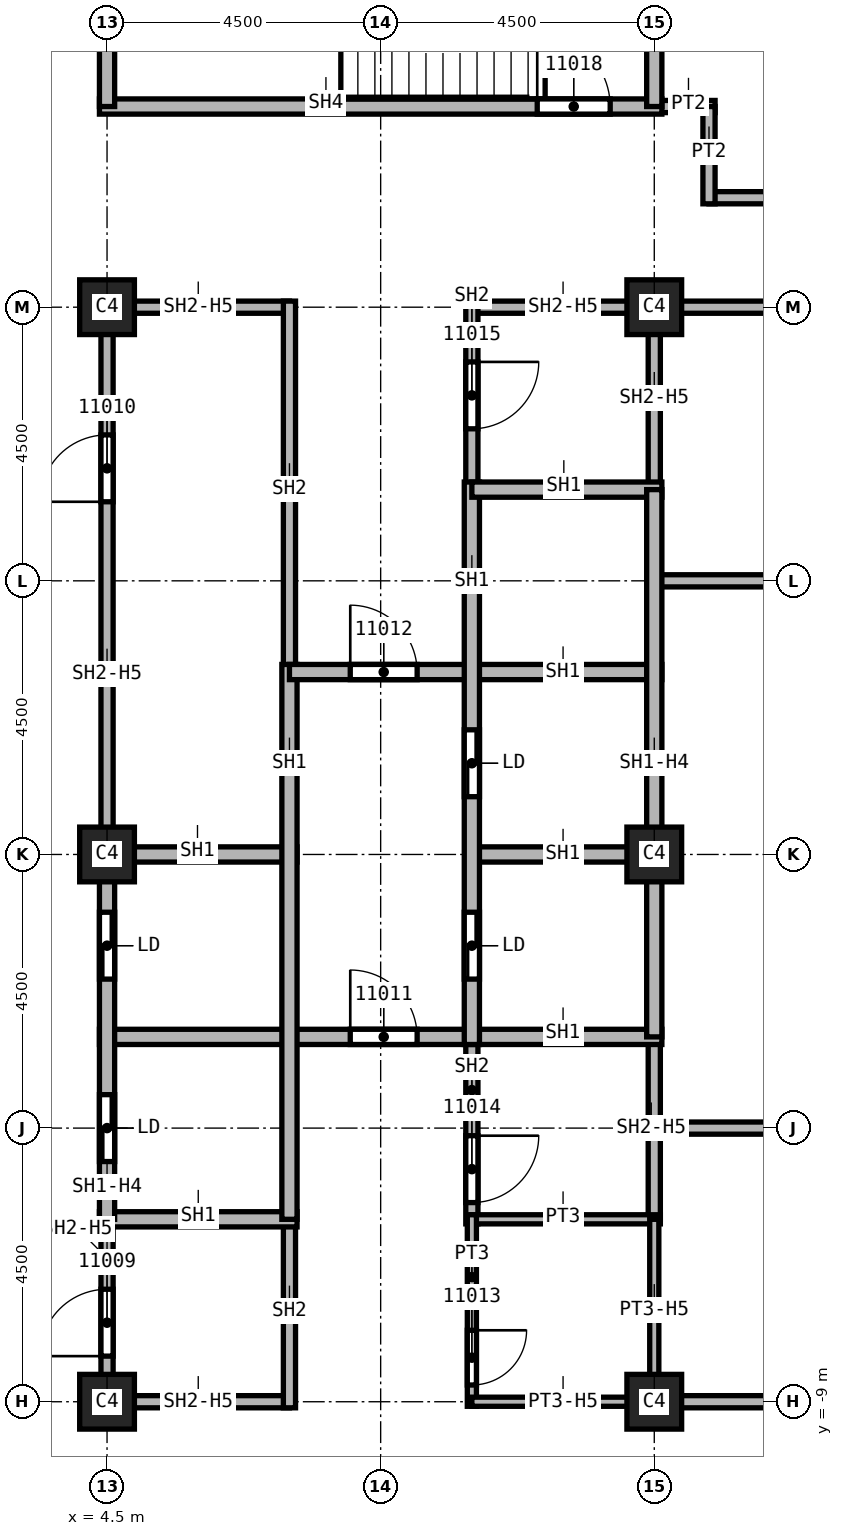
"""IFC4 building model, lengths in metres.
Left out: names, types, materials, properties, quantities, classifications, styles, units other than length and angle.
Written with IfcOpenShell. Run it as: python <this file> out.ifc"""

import sys

from ifc_helpers import new_model, si_unit, direction, frame, frame_2d, origin, origin_2d, place, context, subcontext, project, spatial, rectangle, extrude, element, fill, save


model = new_model("IFC4")
c1 = context("Model", 3, precision=1e-05, world=origin(), true_north=direction((0.0, 1.0)))
c2 = subcontext(c1, "Body", "Model", "MODEL_VIEW")
j1 = project(units=[si_unit("LENGTHUNIT", "METRE"), si_unit("PLANEANGLEUNIT", "RADIAN")], contexts=[c1])
p1 = place(None, origin())
s1 = spatial("IfcSite", under=j1, at=p1, CompositionType="ELEMENT")
p2 = place(p1, origin())
s2 = spatial("IfcBuilding", under=s1, at=p2, CompositionType="ELEMENT")
p3 = place(p2, frame((0.0, 0.0, 188.0)))
s3 = spatial("IfcBuildingStorey", under=s2, at=p3, CompositionType="ELEMENT", Elevation=188.0)
for number, where, z_axis, x_axis in (
    (1, (4.5, 0.0, 0.0), (0.0, 0.0, 1.0), (1.0, 0.0, 0.0)),
    (2, (4.5, 9.0, 0.0), (0.0, 0.0, 1.0), (1.0, 0.0, 0.0)),
    (3, (4.5, -9.0, 0.0), (0.0, 0.0, 1.0), (1.0, 0.0, 0.0)),
    (4, (13.5, 0.0, 0.0), (0.0, 0.0, 1.0), (1.0, 0.0, 0.0)),
    (5, (13.5, 9.0, 0.0), (0.0, 0.0, 1.0), (1.0, 0.0, 0.0)),
    (6, (13.5, -9.0, 0.0), (0.0, 0.0, 1.0), (1.0, 0.0, 0.0)),
):
    element("IfcColumn", number, at=place(p3, frame(where, z_axis=z_axis, x_axis=x_axis)), inside=s3, PredefinedType="COLUMN", context=c2, shape_type="SweptSolid", body=[
        extrude(rectangle(XDim=0.9, YDim=0.9, at=origin_2d()), origin(), (0.0, 0.0, 1.0), 3.72),
    ])
p4 = place(p3, frame((13.375, 12.3, 0.0), z_axis=(0.0, 0.0, 1.0), x_axis=(1.0, 0.0, 0.0)))
e7 = element("IfcWall", 7, at=p4, inside=s3, PredefinedType="PARTITIONING", context=c2, shape_type="SweptSolid", body=[
    extrude(rectangle(XDim=1.125, YDim=0.2, at=frame_2d((0.562, 0.0))), origin(), (0.0, 0.0, 1.0), 3.72),
])
for number, where, z_axis, x_axis in (
    (8, (13.5, -9.0, 0.0), (0.0, 0.0, 1.0), (1.0, 0.0, 0.0)),
    (9, (13.5, -4.5, 0.0), (0.0, 0.0, 1.0), (1.0, 0.0, 0.0)),
    (10, (13.5, 4.5, 0.0), (0.0, 0.0, 1.0), (1.0, 0.0, 0.0)),
    (11, (18.0, 9.0, 0.0), (0.0, 0.0, 1.0), (-1.0, 0.0, 0.0)),
):
    element("IfcWall", number, at=place(p3, frame(where, z_axis=z_axis, x_axis=x_axis)), inside=s3, PredefinedType="PARTITIONING", context=c2, shape_type="SweptSolid", body=[
        extrude(rectangle(XDim=4.5, YDim=0.2, at=frame_2d((2.25, 0.0))), origin(), (0.0, 0.0, 1.0), 3.72),
    ])
p5 = place(p3, frame((14.4, 10.8, 0.0), z_axis=(0.0, 0.0, 1.0), x_axis=(1.0, 0.0, 0.0)))
e12 = element("IfcWall", 12, at=p5, inside=s3, PredefinedType="PARTITIONING", context=c2, shape_type="SweptSolid", body=[
    extrude(rectangle(XDim=3.6, YDim=0.2, at=frame_2d((1.8, 0.0))), origin(), (0.0, 0.0, 1.0), 3.72),
])
p6 = place(p3, frame((14.4, 12.3, 0.0), z_axis=(0.0, 0.0, 1.0), x_axis=(0.0, -1.0, 0.0)))
e13 = element("IfcWall", 13, at=p6, inside=s3, PredefinedType="PARTITIONING", context=c2, shape_type="SweptSolid", body=[
    extrude(rectangle(XDim=1.6, YDim=0.2, at=frame_2d((0.8, 0.0))), origin(), (0.0, 0.0, 1.0), 3.72),
])
p7 = place(p3, frame((4.5, -9.1, 0.0), z_axis=(0.0, 0.0, 1.0), x_axis=(0.0, 1.0, 0.0)))
e14 = element("IfcWall", 14, at=p7, inside=s3, PredefinedType="SOLIDWALL", context=c2, shape_type="SweptSolid", body=[
    extrude(rectangle(XDim=3.1, YDim=0.2, at=frame_2d((1.55, 0.0))), origin(), (0.0, 0.0, 1.0), 2.958),
])
p8 = place(p7, frame((0.85, 0.0, 0.0)))
e15 = element("IfcOpeningElement", 15, at=p8, cuts=e14, PredefinedType="OPENING", context=c2, shape_type="SweptSolid", body=[
    extrude(rectangle(XDim=1.1, YDim=2.1, at=frame_2d((0.55, 1.05))), frame((0.0, 0.1, 0.0), z_axis=(0.0, -1.0, 0.0), x_axis=(1.0, 0.0, 0.0)), (0.0, 0.0, 1.0), 0.2),
])
p9 = place(p3, frame((4.5, 0.0, 0.0), z_axis=(0.0, 0.0, 1.0), x_axis=(0.0, 1.0, 0.0)))
e16 = element("IfcWall", 16, at=p9, inside=s3, PredefinedType="SOLIDWALL", context=c2, shape_type="SweptSolid", body=[
    extrude(rectangle(XDim=9.1, YDim=0.2, at=frame_2d((4.55, 0.0))), origin(), (0.0, 0.0, 1.0), 2.958),
])
p10 = place(p9, frame((5.8, 0.0, 0.0)))
e17 = element("IfcOpeningElement", 17, at=p10, cuts=e16, PredefinedType="OPENING", context=c2, shape_type="SweptSolid", body=[
    extrude(rectangle(XDim=1.1, YDim=2.1, at=frame_2d((0.55, 1.05))), frame((0.0, 0.1, 0.0), z_axis=(0.0, -1.0, 0.0), x_axis=(1.0, 0.0, 0.0)), (0.0, 0.0, 1.0), 0.2),
])
for number, where, z_axis, x_axis in (
    (18, (4.5, 9.0, 0.0), (0.0, 0.0, 1.0), (1.0, 0.0, 0.0)),
    (19, (7.5, -9.0, 0.0), (0.0, 0.0, 1.0), (-1.0, 0.0, 0.0)),
):
    element("IfcWall", number, at=place(p3, frame(where, z_axis=z_axis, x_axis=x_axis)), inside=s3, PredefinedType="SOLIDWALL", context=c2, shape_type="SweptSolid", body=[
        extrude(rectangle(XDim=3.0, YDim=0.2, at=frame_2d((1.5, 0.0))), origin(), (0.0, 0.0, 1.0), 2.958),
    ])
p11 = place(p3, frame((7.5, -6.0, 0.0), z_axis=(0.0, 0.0, 1.0), x_axis=(0.0, -1.0, 0.0)))
e20 = element("IfcWall", 20, at=p11, inside=s3, PredefinedType="SOLIDWALL", context=c2, shape_type="SweptSolid", body=[
    extrude(rectangle(XDim=3.1, YDim=0.2, at=frame_2d((1.55, 0.0))), origin(), (0.0, 0.0, 1.0), 3.72),
])
p12 = place(p3, frame((7.5, 9.1, 0.0), z_axis=(0.0, 0.0, 1.0), x_axis=(0.0, -1.0, 0.0)))
e21 = element("IfcWall", 21, at=p12, inside=s3, PredefinedType="SOLIDWALL", context=c2, shape_type="SweptSolid", body=[
    extrude(rectangle(XDim=6.225, YDim=0.2, at=frame_2d((3.113, 0.0))), origin(), (0.0, 0.0, 1.0), 3.72),
])
p13 = place(p3, frame((10.5, -2.875, 0.0), z_axis=(0.0, 0.0, 1.0), x_axis=(0.0, -1.0, 0.0)))
e22 = element("IfcWall", 22, at=p13, inside=s3, PredefinedType="SOLIDWALL", context=c2, shape_type="SweptSolid", body=[
    extrude(rectangle(XDim=3.2, YDim=0.2, at=frame_2d((1.6, 0.0))), origin(), (0.0, 0.0, 1.0), 3.72),
])
p14 = place(p13, frame((1.75, 0.0, 0.0)))
e23 = element("IfcOpeningElement", 23, at=p14, cuts=e22, PredefinedType="OPENING", context=c2, shape_type="SweptSolid", body=[
    extrude(rectangle(XDim=1.1, YDim=2.1, at=frame_2d((0.55, 1.05))), frame((0.0, 0.1, 0.0), z_axis=(0.0, -1.0, 0.0), x_axis=(1.0, 0.0, 0.0)), (0.0, 0.0, 1.0), 0.2),
])
p15 = place(p3, frame((10.5, 9.0, 0.0), z_axis=(0.0, 0.0, 1.0), x_axis=(1.0, 0.0, 0.0)))
e24 = element("IfcWall", 24, at=p15, inside=s3, PredefinedType="SOLIDWALL", context=c2, shape_type="SweptSolid", body=[
    extrude(rectangle(XDim=3.1, YDim=0.2, at=frame_2d((1.55, 0.0))), origin(), (0.0, 0.0, 1.0), 2.958),
])
p16 = place(p3, frame((10.5, 9.1, 0.0), z_axis=(0.0, 0.0, 1.0), x_axis=(0.0, -1.0, 0.0)))
e25 = element("IfcWall", 25, at=p16, inside=s3, PredefinedType="SOLIDWALL", context=c2, shape_type="SweptSolid", body=[
    extrude(rectangle(XDim=3.225, YDim=0.2, at=frame_2d((1.613, 0.0))), origin(), (0.0, 0.0, 1.0), 3.72),
])
p17 = place(p16, frame((1.0, 0.0, 0.0)))
e26 = element("IfcOpeningElement", 26, at=p17, cuts=e25, PredefinedType="OPENING", context=c2, shape_type="SweptSolid", body=[
    extrude(rectangle(XDim=1.1, YDim=2.1, at=frame_2d((0.55, 1.05))), frame((0.0, 0.1, 0.0), z_axis=(0.0, -1.0, 0.0), x_axis=(1.0, 0.0, 0.0)), (0.0, 0.0, 1.0), 0.2),
])
p18 = place(p3, frame((13.5, -3.0, 0.0), z_axis=(0.0, 0.0, 1.0), x_axis=(0.0, -1.0, 0.0)))
e27 = element("IfcWall", 27, at=p18, inside=s3, PredefinedType="SOLIDWALL", context=c2, shape_type="SweptSolid", body=[
    extrude(rectangle(XDim=3.0, YDim=0.2, at=frame_2d((1.5, 0.0))), origin(), (0.0, 0.0, 1.0), 2.958),
])
p19 = place(p3, frame((13.5, 9.1, 0.0), z_axis=(0.0, 0.0, 1.0), x_axis=(0.0, -1.0, 0.0)))
e28 = element("IfcWall", 28, at=p19, inside=s3, PredefinedType="SOLIDWALL", context=c2, shape_type="SweptSolid", body=[
    extrude(rectangle(XDim=3.1, YDim=0.2, at=frame_2d((1.55, 0.0))), origin(), (0.0, 0.0, 1.0), 2.958),
])
p20 = place(p3, frame((4.375, -6.0, 0.0), z_axis=(0.0, 0.0, 1.0), x_axis=(1.0, 0.0, 0.0)))
e29 = element("IfcWall", 29, at=p20, inside=s3, PredefinedType="SOLIDWALL", context=c2, shape_type="SweptSolid", body=[
    extrude(rectangle(XDim=3.25, YDim=0.25, at=frame_2d((1.625, 0.0))), origin(), (0.0, 0.0, 1.0), 3.72),
])
p21 = place(p3, frame((4.375, -3.0, 0.0), z_axis=(0.0, 0.0, 1.0), x_axis=(1.0, 0.0, 0.0)))
e30 = element("IfcWall", 30, at=p21, inside=s3, PredefinedType="SOLIDWALL", context=c2, shape_type="SweptSolid", body=[
    extrude(rectangle(XDim=9.25, YDim=0.25, at=frame_2d((4.625, 0.0))), origin(), (0.0, 0.0, 1.0), 3.72),
])
p22 = place(p21, frame((4.125, 0.0, 0.0)))
e31 = element("IfcOpeningElement", 31, at=p22, cuts=e30, PredefinedType="OPENING", context=c2, shape_type="SweptSolid", body=[
    extrude(rectangle(XDim=1.1, YDim=2.1, at=frame_2d((0.55, 1.05))), frame((0.0, 0.125, 0.0), z_axis=(0.0, -1.0, 0.0), x_axis=(1.0, 0.0, 0.0)), (0.0, 0.0, 1.0), 0.25),
])
p23 = place(p3, frame((4.375, 0.0, 0.0), z_axis=(0.0, 0.0, 1.0), x_axis=(1.0, 0.0, 0.0)))
e32 = element("IfcWall", 32, at=p23, inside=s3, PredefinedType="SOLIDWALL", context=c2, shape_type="SweptSolid", body=[
    extrude(rectangle(XDim=3.25, YDim=0.25, at=frame_2d((1.625, 0.0))), origin(), (0.0, 0.0, 1.0), 3.72),
])
p24 = place(p3, frame((4.5, -6.0, 0.0), z_axis=(0.0, 0.0, 1.0), x_axis=(0.0, 1.0, 0.0)))
e33 = element("IfcWall", 33, at=p24, inside=s3, PredefinedType="SOLIDWALL", context=c2, shape_type="SweptSolid", body=[
    extrude(rectangle(XDim=6.0, YDim=0.25, at=frame_2d((3.0, 0.0))), origin(), (0.0, 0.0, 1.0), 2.958),
])
p25 = place(p24, frame((0.95, 0.0, 0.0)))
e34 = element("IfcOpeningElement", 34, at=p25, cuts=e33, PredefinedType="OPENING", context=c2, shape_type="SweptSolid", body=[
    extrude(rectangle(XDim=1.1, YDim=2.1, at=frame_2d((0.55, 1.05))), frame((0.0, 0.125, 0.0), z_axis=(0.0, -1.0, 0.0), x_axis=(1.0, 0.0, 0.0)), (0.0, 0.0, 1.0), 0.25),
])
p26 = place(p24, frame((3.95, 0.0, 0.0)))
e35 = element("IfcOpeningElement", 35, at=p26, cuts=e33, PredefinedType="OPENING", context=c2, shape_type="SweptSolid", body=[
    extrude(rectangle(XDim=1.1, YDim=2.1, at=frame_2d((0.55, 1.05))), frame((0.0, 0.125, 0.0), z_axis=(0.0, -1.0, 0.0), x_axis=(1.0, 0.0, 0.0)), (0.0, 0.0, 1.0), 0.25),
])
p27 = place(p3, frame((7.5, 3.125, 0.0), z_axis=(0.0, 0.0, 1.0), x_axis=(0.0, -1.0, 0.0)))
e36 = element("IfcWall", 36, at=p27, inside=s3, PredefinedType="SOLIDWALL", context=c2, shape_type="SweptSolid", body=[
    extrude(rectangle(XDim=9.125, YDim=0.25, at=frame_2d((4.562, 0.0))), origin(), (0.0, 0.0, 1.0), 3.72),
])
p28 = place(p3, frame((7.5, 3.0, 0.0), z_axis=(0.0, 0.0, 1.0), x_axis=(1.0, 0.0, 0.0)))
e37 = element("IfcWall", 37, at=p28, inside=s3, PredefinedType="SOLIDWALL", context=c2, shape_type="SweptSolid", body=[
    extrude(rectangle(XDim=6.125, YDim=0.25, at=frame_2d((3.062, 0.0))), origin(), (0.0, 0.0, 1.0), 3.72),
])
p29 = place(p28, frame((1.0, 0.0, 0.0)))
e38 = element("IfcOpeningElement", 38, at=p29, cuts=e37, PredefinedType="OPENING", context=c2, shape_type="SweptSolid", body=[
    extrude(rectangle(XDim=1.1, YDim=2.1, at=frame_2d((0.55, 1.05))), frame((0.0, 0.125, 0.0), z_axis=(0.0, -1.0, 0.0), x_axis=(1.0, 0.0, 0.0)), (0.0, 0.0, 1.0), 0.25),
])
p30 = place(p3, frame((10.5, 0.0, 0.0), z_axis=(0.0, 0.0, 1.0), x_axis=(1.0, 0.0, 0.0)))
e39 = element("IfcWall", 39, at=p30, inside=s3, PredefinedType="SOLIDWALL", context=c2, shape_type="SweptSolid", body=[
    extrude(rectangle(XDim=3.125, YDim=0.25, at=frame_2d((1.562, 0.0))), origin(), (0.0, 0.0, 1.0), 3.72),
])
p31 = place(p3, frame((10.5, 6.125, 0.0), z_axis=(0.0, 0.0, 1.0), x_axis=(0.0, -1.0, 0.0)))
e40 = element("IfcWall", 40, at=p31, inside=s3, PredefinedType="SOLIDWALL", context=c2, shape_type="SweptSolid", body=[
    extrude(rectangle(XDim=9.25, YDim=0.25, at=frame_2d((4.625, 0.0))), origin(), (0.0, 0.0, 1.0), 3.72),
])
p32 = place(p31, frame((7.075, 0.0, 0.0)))
e41 = element("IfcOpeningElement", 41, at=p32, cuts=e40, PredefinedType="OPENING", context=c2, shape_type="SweptSolid", body=[
    extrude(rectangle(XDim=1.1, YDim=2.1, at=frame_2d((0.55, 1.05))), frame((0.0, 0.125, 0.0), z_axis=(0.0, -1.0, 0.0), x_axis=(1.0, 0.0, 0.0)), (0.0, 0.0, 1.0), 0.25),
])
p33 = place(p31, frame((4.075, 0.0, 0.0)))
e42 = element("IfcOpeningElement", 42, at=p33, cuts=e40, PredefinedType="OPENING", context=c2, shape_type="SweptSolid", body=[
    extrude(rectangle(XDim=1.1, YDim=2.1, at=frame_2d((0.55, 1.05))), frame((0.0, 0.125, 0.0), z_axis=(0.0, -1.0, 0.0), x_axis=(1.0, 0.0, 0.0)), (0.0, 0.0, 1.0), 0.25),
])
p34 = place(p3, frame((10.5, 6.0, 0.0), z_axis=(0.0, 0.0, 1.0), x_axis=(1.0, 0.0, 0.0)))
e43 = element("IfcWall", 43, at=p34, inside=s3, PredefinedType="SOLIDWALL", context=c2, shape_type="SweptSolid", body=[
    extrude(rectangle(XDim=3.125, YDim=0.25, at=frame_2d((1.562, 0.0))), origin(), (0.0, 0.0, 1.0), 3.72),
])
p35 = place(p3, frame((13.5, 6.0, 0.0), z_axis=(0.0, 0.0, 1.0), x_axis=(0.0, -1.0, 0.0)))
e44 = element("IfcWall", 44, at=p35, inside=s3, PredefinedType="SOLIDWALL", context=c2, shape_type="SweptSolid", body=[
    extrude(rectangle(XDim=9.0, YDim=0.25, at=frame_2d((4.5, 0.0))), origin(), (0.0, 0.0, 1.0), 2.958),
])
p36 = place(p3, frame((4.375, 12.3, 0.0), z_axis=(0.0, 0.0, 1.0), x_axis=(1.0, 0.0, 0.0)))
e45 = element("IfcWall", 45, at=p36, inside=s3, PredefinedType="SOLIDWALL", context=c2, shape_type="SweptSolid", body=[
    extrude(rectangle(XDim=9.25, YDim=0.25, at=frame_2d((4.625, 0.0))), origin(), (0.0, 0.0, 1.0), 3.72),
])
p37 = place(p36, frame((7.2, 0.0, 0.0)))
e46 = element("IfcOpeningElement", 46, at=p37, cuts=e45, PredefinedType="OPENING", context=c2, shape_type="SweptSolid", body=[
    extrude(rectangle(XDim=1.2, YDim=2.1, at=frame_2d((0.6, 1.05))), frame((0.0, 0.125, 0.0), z_axis=(0.0, -1.0, 0.0), x_axis=(1.0, 0.0, 0.0)), (0.0, 0.0, 1.0), 0.25),
])
for number, where, z_axis, x_axis in (
    (47, (4.5, 12.3, 0.0), (0.0, 0.0, 1.0), (0.0, 1.0, 0.0)),
    (48, (13.5, 16.8, 0.0), (0.0, 0.0, 1.0), (0.0, -1.0, 0.0)),
):
    element("IfcWall", number, at=place(p3, frame(where, z_axis=z_axis, x_axis=x_axis)), inside=s3, PredefinedType="SOLIDWALL", context=c2, shape_type="SweptSolid", body=[
        extrude(rectangle(XDim=4.5, YDim=0.25, at=frame_2d((2.25, 0.0))), origin(), (0.0, 0.0, 1.0), 3.72),
    ])
p38 = place(p3, frame((10.5, -6.0, 0.0), z_axis=(0.0, 0.0, 1.0), x_axis=(1.0, 0.0, 0.0)))
e49 = element("IfcWall", 49, at=p38, inside=s3, PredefinedType="PARTITIONING", context=c2, shape_type="SweptSolid", body=[
    extrude(rectangle(XDim=3.1, YDim=0.15, at=frame_2d((1.55, 0.0))), origin(), (0.0, 0.0, 1.0), 3.72),
])
p39 = place(p3, frame((10.5, -5.925, 0.0), z_axis=(0.0, 0.0, 1.0), x_axis=(0.0, -1.0, 0.0)))
e50 = element("IfcWall", 50, at=p39, inside=s3, PredefinedType="PARTITIONING", context=c2, shape_type="SweptSolid", body=[
    extrude(rectangle(XDim=3.15, YDim=0.15, at=frame_2d((1.575, 0.0))), origin(), (0.0, 0.0, 1.0), 3.72),
])
p40 = place(p39, frame((1.9, 0.0, 0.0)))
e51 = element("IfcOpeningElement", 51, at=p40, cuts=e50, PredefinedType="OPENING", context=c2, shape_type="SweptSolid", body=[
    extrude(rectangle(XDim=0.9, YDim=2.1, at=frame_2d((0.45, 1.05))), frame((0.0, 0.075, 0.0), z_axis=(0.0, -1.0, 0.0), x_axis=(1.0, 0.0, 0.0)), (0.0, 0.0, 1.0), 0.15),
])
p41 = place(p3, frame((13.5, -6.0, 0.0), z_axis=(0.0, 0.0, 1.0), x_axis=(0.0, -1.0, 0.0)))
e52 = element("IfcWall", 52, at=p41, inside=s3, PredefinedType="PARTITIONING", context=c2, shape_type="SweptSolid", body=[
    extrude(rectangle(XDim=3.1, YDim=0.15, at=frame_2d((1.55, 0.0))), origin(), (0.0, 0.0, 1.0), 2.958),
])
p42 = place(p3, frame((13.575, -9.0, 0.0), z_axis=(0.0, 0.0, 1.0), x_axis=(-1.0, 0.0, 0.0)))
e53 = element("IfcWall", 53, at=p42, inside=s3, PredefinedType="PARTITIONING", context=c2, shape_type="SweptSolid", body=[
    extrude(rectangle(XDim=3.075, YDim=0.15, at=frame_2d((1.538, 0.0))), origin(), (0.0, 0.0, 1.0), 2.958),
])
p43 = place(p8, origin())
e54 = element("IfcDoor", 54, at=p43, inside=s3, OperationType="SINGLE_SWING_RIGHT", PredefinedType="DOOR", context=c2, shape_type="SweptSolid", body=[
    extrude(rectangle(XDim=1.1, YDim=2.1, at=frame_2d((0.55, 1.05))), frame((0.0, 0.025, 0.0), z_axis=(0.0, -1.0, 0.0), x_axis=(1.0, 0.0, 0.0)), (0.0, 0.0, 1.0), 0.05),
])
fill(e15, e54)
p44 = place(p10, origin())
e55 = element("IfcDoor", 55, at=p44, inside=s3, OperationType="SINGLE_SWING_LEFT", PredefinedType="DOOR", context=c2, shape_type="SweptSolid", body=[
    extrude(rectangle(XDim=1.1, YDim=2.1, at=frame_2d((0.55, 1.05))), frame((0.0, 0.025, 0.0), z_axis=(0.0, -1.0, 0.0), x_axis=(1.0, 0.0, 0.0)), (0.0, 0.0, 1.0), 0.05),
])
fill(e17, e55)
p45 = place(p22, origin())
e56 = element("IfcDoor", 56, at=p45, inside=s3, OperationType="SINGLE_SWING_RIGHT", PredefinedType="DOOR", context=c2, shape_type="SweptSolid", body=[
    extrude(rectangle(XDim=1.1, YDim=2.1, at=frame_2d((0.55, 1.05))), frame((0.0, 0.025, 0.0), z_axis=(0.0, -1.0, 0.0), x_axis=(1.0, 0.0, 0.0)), (0.0, 0.0, 1.0), 0.05),
])
fill(e31, e56)
p46 = place(p29, origin())
e57 = element("IfcDoor", 57, at=p46, inside=s3, OperationType="SINGLE_SWING_LEFT", PredefinedType="DOOR", context=c2, shape_type="SweptSolid", body=[
    extrude(rectangle(XDim=1.1, YDim=2.1, at=frame_2d((0.55, 1.05))), frame((0.0, 0.025, 0.0), z_axis=(0.0, -1.0, 0.0), x_axis=(1.0, 0.0, 0.0)), (0.0, 0.0, 1.0), 0.05),
])
fill(e38, e57)
p47 = place(p40, origin())
e58 = element("IfcDoor", 58, at=p47, inside=s3, OperationType="SINGLE_SWING_RIGHT", PredefinedType="DOOR", context=c2, shape_type="SweptSolid", body=[
    extrude(rectangle(XDim=0.9, YDim=2.1, at=frame_2d((0.45, 1.05))), frame((0.0, 0.025, 0.0), z_axis=(0.0, -1.0, 0.0), x_axis=(1.0, 0.0, 0.0)), (0.0, 0.0, 1.0), 0.05),
])
fill(e51, e58)
p48 = place(p14, origin())
e59 = element("IfcDoor", 59, at=p48, inside=s3, OperationType="SINGLE_SWING_LEFT", PredefinedType="DOOR", context=c2, shape_type="SweptSolid", body=[
    extrude(rectangle(XDim=1.1, YDim=2.1, at=frame_2d((0.55, 1.05))), frame((0.0, 0.025, 0.0), z_axis=(0.0, -1.0, 0.0), x_axis=(1.0, 0.0, 0.0)), (0.0, 0.0, 1.0), 0.05),
])
fill(e23, e59)
p49 = place(p17, origin())
e60 = element("IfcDoor", 60, at=p49, inside=s3, OperationType="SINGLE_SWING_RIGHT", PredefinedType="DOOR", context=c2, shape_type="SweptSolid", body=[
    extrude(rectangle(XDim=1.1, YDim=2.1, at=frame_2d((0.55, 1.05))), frame((0.0, 0.025, 0.0), z_axis=(0.0, -1.0, 0.0), x_axis=(1.0, 0.0, 0.0)), (0.0, 0.0, 1.0), 0.05),
])
fill(e26, e60)
p50 = place(p37, origin())
e61 = element("IfcDoor", 61, at=p50, inside=s3, OperationType="SINGLE_SWING_LEFT", PredefinedType="DOOR", context=c2, shape_type="SweptSolid", body=[
    extrude(rectangle(XDim=1.2, YDim=2.1, at=frame_2d((0.6, 1.05))), frame((0.0, 0.025, 0.0), z_axis=(0.0, -1.0, 0.0), x_axis=(1.0, 0.0, 0.0)), (0.0, 0.0, 1.0), 0.05),
])
fill(e46, e61)
p51 = place(p25, origin())
e62 = element("IfcDoor", 62, at=p51, inside=s3, OperationType="SLIDING_TO_LEFT", PredefinedType="DOOR", context=c2, shape_type="SweptSolid", body=[
    extrude(rectangle(XDim=1.1, YDim=2.1, at=frame_2d((0.55, 1.05))), frame((0.0, 0.025, 0.0), z_axis=(0.0, -1.0, 0.0), x_axis=(1.0, 0.0, 0.0)), (0.0, 0.0, 1.0), 0.05),
])
fill(e34, e62)
p52 = place(p26, origin())
e63 = element("IfcDoor", 63, at=p52, inside=s3, OperationType="SLIDING_TO_LEFT", PredefinedType="DOOR", context=c2, shape_type="SweptSolid", body=[
    extrude(rectangle(XDim=1.1, YDim=2.1, at=frame_2d((0.55, 1.05))), frame((0.0, 0.025, 0.0), z_axis=(0.0, -1.0, 0.0), x_axis=(1.0, 0.0, 0.0)), (0.0, 0.0, 1.0), 0.05),
])
fill(e35, e63)
p53 = place(p32, origin())
e64 = element("IfcDoor", 64, at=p53, inside=s3, OperationType="SLIDING_TO_LEFT", PredefinedType="DOOR", context=c2, shape_type="SweptSolid", body=[
    extrude(rectangle(XDim=1.1, YDim=2.1, at=frame_2d((0.55, 1.05))), frame((0.0, 0.025, 0.0), z_axis=(0.0, -1.0, 0.0), x_axis=(1.0, 0.0, 0.0)), (0.0, 0.0, 1.0), 0.05),
])
fill(e41, e64)
p54 = place(p33, origin())
e65 = element("IfcDoor", 65, at=p54, inside=s3, OperationType="SLIDING_TO_LEFT", PredefinedType="DOOR", context=c2, shape_type="SweptSolid", body=[
    extrude(rectangle(XDim=1.1, YDim=2.1, at=frame_2d((0.55, 1.05))), frame((0.0, 0.025, 0.0), z_axis=(0.0, -1.0, 0.0), x_axis=(1.0, 0.0, 0.0)), (0.0, 0.0, 1.0), 0.05),
])
fill(e42, e65)
save(model, sys.argv[1])
